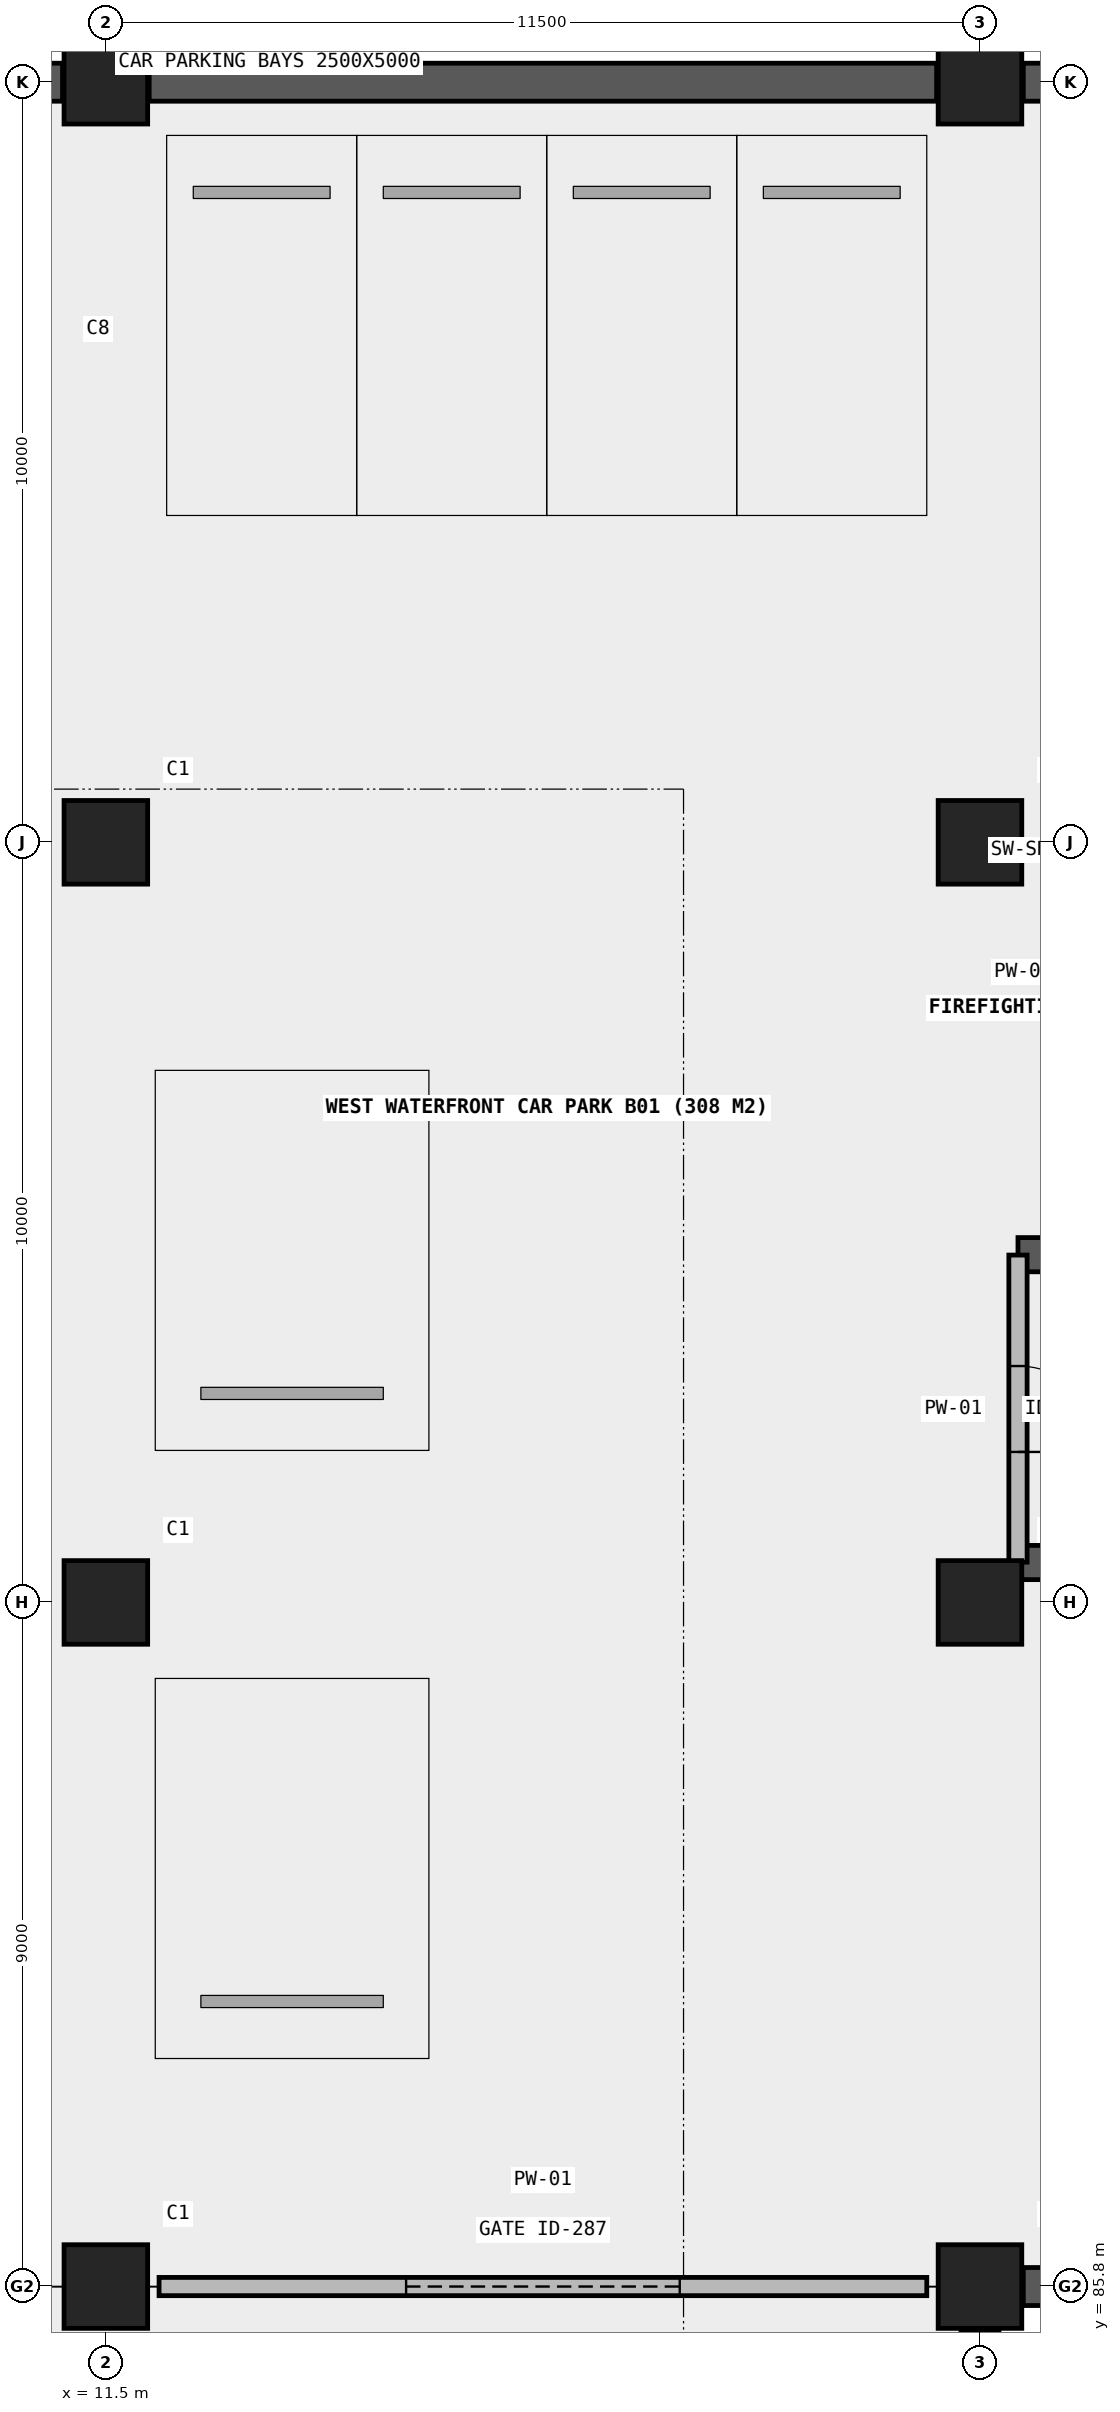
"""IFC4 building model, lengths in metres.
Left out: names, types, materials, properties, quantities, classifications, styles, units other than length and angle.
Written with IfcOpenShell. Run it as: python <this file> out.ifc"""

import sys

from ifc_helpers import new_model, si_unit, direction, frame, frame_2d, origin, origin_2d, place, context, subcontext, project, spatial, rectangle, extrude, element, fill, save


model = new_model("IFC4")
c1 = context("Model", 3, precision=1e-05, world=origin(), true_north=direction((0.0, 1.0)))
c2 = subcontext(c1, "Body", "Model", "MODEL_VIEW")
j1 = project(units=[si_unit("LENGTHUNIT", "METRE"), si_unit("PLANEANGLEUNIT", "RADIAN")], contexts=[c1])
p1 = place(None, origin())
s1 = spatial("IfcSite", under=j1, at=p1, CompositionType="ELEMENT")
p2 = place(p1, origin())
s2 = spatial("IfcBuilding", under=s1, at=p2, CompositionType="ELEMENT")
p3 = place(p2, frame((0.0, 0.0, -4.2)))
s3 = spatial("IfcBuildingStorey", under=s2, at=p3, CompositionType="ELEMENT", Elevation=-4.2)
for number, where, z_axis, x_axis in (
    (1, (11.5, 85.8, 0.0), (0.0, 0.0, 1.0), (1.0, 0.0, 0.0)),
    (2, (11.5, 94.8, 0.0), (0.0, 0.0, 1.0), (1.0, 0.0, 0.0)),
    (3, (11.5, 104.8, 0.0), (0.0, 0.0, 1.0), (1.0, 0.0, 0.0)),
    (4, (11.5, 114.8, 0.0), (0.0, 0.0, 1.0), (1.0, 0.0, 0.0)),
    (5, (23.0, 85.8, 0.0), (0.0, 0.0, 1.0), (1.0, 0.0, 0.0)),
    (6, (23.0, 94.8, 0.0), (0.0, 0.0, 1.0), (1.0, 0.0, 0.0)),
    (7, (23.0, 104.8, 0.0), (0.0, 0.0, 1.0), (1.0, 0.0, 0.0)),
    (8, (23.0, 114.8, 0.0), (0.0, 0.0, 1.0), (1.0, 0.0, 0.0)),
):
    element("IfcColumn", number, at=place(p3, frame(where, z_axis=z_axis, x_axis=x_axis)), inside=s3, PredefinedType="COLUMN", context=c2, shape_type="SweptSolid", body=[
        extrude(rectangle(XDim=1.1, YDim=1.1, at=origin_2d()), origin(), (0.0, 0.0, 1.0), 4.2),
    ])
p4 = place(p3, frame((23.0, 78.395, 0.0), z_axis=(0.0, 0.0, 1.0), x_axis=(0.0, 1.0, 0.0)))
e9 = element("IfcWall", 9, at=p4, inside=s3, PredefinedType="SHEAR", context=c2, shape_type="SweptSolid", body=[
    extrude(rectangle(XDim=6.835, YDim=0.5, at=frame_2d((3.417, 0.0))), origin(), (0.0, 0.0, 1.0), 4.2),
])
for number, where, z_axis, x_axis in (
    (10, (23.57, 85.8, 0.0), (0.0, 0.0, 1.0), (1.0, 0.0, 0.0)),
    (11, (0.57, 114.8, 0.0), (0.0, 0.0, 1.0), (1.0, 0.0, 0.0)),
    (12, (12.07, 114.8, 0.0), (0.0, 0.0, 1.0), (1.0, 0.0, 0.0)),
    (13, (23.57, 114.8, 0.0), (0.0, 0.0, 1.0), (1.0, 0.0, 0.0)),
):
    element("IfcWall", number, at=place(p3, frame(where, z_axis=z_axis, x_axis=x_axis)), inside=s3, PredefinedType="SHEAR", context=c2, shape_type="SweptSolid", body=[
        extrude(rectangle(XDim=10.36, YDim=0.5, at=frame_2d((5.18, 0.0))), origin(), (0.0, 0.0, 1.0), 4.2),
    ])
p5 = place(p3, frame((23.5, 95.325, 0.0), z_axis=(0.0, 0.0, 1.0), x_axis=(1.0, 0.0, 0.0)))
e14 = element("IfcWall", 14, at=p5, inside=s3, PredefinedType="SHEAR", context=c2, shape_type="SweptSolid", body=[
    extrude(rectangle(XDim=9.15, YDim=0.45, at=frame_2d((4.575, 0.0))), origin(), (0.0, 0.0, 1.0), 4.2),
])
p6 = place(p3, frame((23.5, 99.375, 0.0), z_axis=(0.0, 0.0, 1.0), x_axis=(1.0, 0.0, 0.0)))
e15 = element("IfcWall", 15, at=p6, inside=s3, PredefinedType="SHEAR", context=c2, shape_type="SweptSolid", body=[
    extrude(rectangle(XDim=9.15, YDim=0.45, at=frame_2d((4.575, 0.0))), origin(), (0.0, 0.0, 1.0), 4.2),
])
p7 = place(p6, frame((0.55, 0.0, 0.0)))
e16 = element("IfcOpeningElement", 16, at=p7, cuts=e15, PredefinedType="OPENING", context=c2, shape_type="SweptSolid", body=[
    extrude(rectangle(XDim=1.13, YDim=2.15, at=frame_2d((0.565, 1.075))), frame((0.0, 0.235, 0.0), z_axis=(0.0, -1.0, 0.0), x_axis=(1.0, 0.0, 0.0)), (0.0, 0.0, 1.0), 0.47),
])
p8 = place(p3, frame((23.5, 95.33, 0.0), z_axis=(0.0, 0.0, 1.0), x_axis=(0.0, 1.0, 0.0)))
e17 = element("IfcWall", 17, at=p8, inside=s3, PredefinedType="SOLIDWALL", context=c2, shape_type="SweptSolid", body=[
    extrude(rectangle(XDim=4.04, YDim=0.24, at=frame_2d((2.02, 0.0))), origin(), (0.0, 0.0, 1.0), 3.86),
])
p9 = place(p8, frame((1.45, 0.0, 0.0)))
e18 = element("IfcOpeningElement", 18, at=p9, cuts=e17, PredefinedType="OPENING", context=c2, shape_type="SweptSolid", body=[
    extrude(rectangle(XDim=1.13, YDim=2.15, at=frame_2d((0.565, 1.075))), frame((0.0, 0.13, 0.0), z_axis=(0.0, -1.0, 0.0), x_axis=(1.0, 0.0, 0.0)), (0.0, 0.0, 1.0), 0.26),
])
p10 = place(p3, frame((12.2, 85.8, 0.0), z_axis=(0.0, 0.0, 1.0), x_axis=(1.0, 0.0, 0.0)))
e19 = element("IfcWall", 19, at=p10, inside=s3, PredefinedType="SOLIDWALL", context=c2, shape_type="SweptSolid", body=[
    extrude(rectangle(XDim=10.1, YDim=0.24, at=frame_2d((5.05, 0.0))), origin(), (0.0, 0.0, 1.0), 3.08),
])
p11 = place(p10, frame((3.25, 0.0, 0.0)))
e20 = element("IfcOpeningElement", 20, at=p11, cuts=e19, PredefinedType="OPENING", context=c2, shape_type="SweptSolid", body=[
    extrude(rectangle(XDim=3.6, YDim=2.8, at=frame_2d((1.8, 1.4))), frame((0.0, 0.13, 0.0), z_axis=(0.0, -1.0, 0.0), x_axis=(1.0, 0.0, 0.0)), (0.0, 0.0, 1.0), 0.26),
])
p12 = place(p9, frame((0.565, 0.0, 0.0), z_axis=(0.0, 0.0, 1.0), x_axis=(-1.0, 0.0, 0.0)))
e21 = element("IfcDoor", 21, at=p12, inside=s3, OperationType="SINGLE_SWING_LEFT", PredefinedType="DOOR", context=c2, shape_type="SweptSolid", body=[
    extrude(rectangle(XDim=1.13, YDim=2.15, at=frame_2d((0.0, 1.075))), frame((0.0, 0.025, 0.0), z_axis=(0.0, -1.0, 0.0), x_axis=(1.0, 0.0, 0.0)), (0.0, 0.0, 1.0), 0.05),
])
fill(e18, e21)
p13 = place(p11, origin())
e22 = element("IfcDoor", 22, at=p13, inside=s3, OperationType="ROLLINGUP", PredefinedType="GATE", context=c2, shape_type="SweptSolid", body=[
    extrude(rectangle(XDim=3.6, YDim=2.8, at=frame_2d((1.8, 1.4))), frame((0.0, 0.025, 0.0), z_axis=(0.0, -1.0, 0.0), x_axis=(1.0, 0.0, 0.0)), (0.0, 0.0, 1.0), 0.05),
])
fill(e20, e22)
save(model, sys.argv[1])
